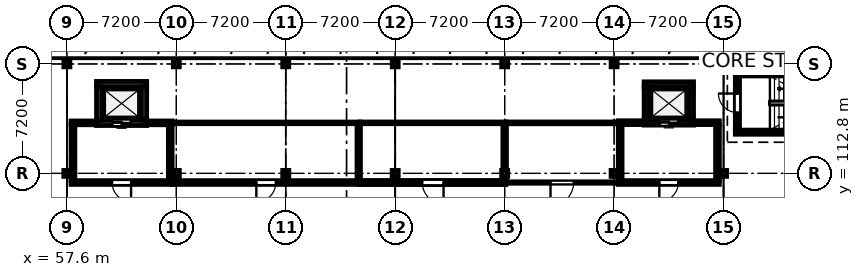
"""IFC4 building model, lengths in metres.
Left out: names, types, materials, properties, quantities, classifications, styles, units other than length and angle.
Written with IfcOpenShell. Run it as: python <this file> out.ifc"""

import sys

from ifc_helpers import new_model, si_unit, direction, frame, frame_2d, origin, origin_2d, place, context, subcontext, project, spatial, rectangle, i_section, extrude, element, fill, save


model = new_model("IFC4")
c1 = context("Model", 3, precision=1e-05, world=origin(), true_north=direction((0.0, 1.0)))
c2 = subcontext(c1, "Body", "Model", "MODEL_VIEW")
j1 = project(units=[si_unit("LENGTHUNIT", "METRE"), si_unit("PLANEANGLEUNIT", "RADIAN")], contexts=[c1])
p1 = place(None, origin())
s1 = spatial("IfcSite", under=j1, at=p1, CompositionType="ELEMENT")
p2 = place(p1, origin())
s2 = spatial("IfcBuilding", under=s1, at=p2, CompositionType="ELEMENT")
p3 = place(p2, frame((0.0, 0.0, 5.4)))
s3 = spatial("IfcBuildingStorey", under=s2, at=p3, CompositionType="ELEMENT", Elevation=5.4)
p4 = place(p3, frame((57.6, 112.8, 0.0), z_axis=(0.0, 0.0, 1.0), x_axis=(1.0, 0.0, 0.0)))
e1 = element("IfcColumn", 1, at=p4, inside=s3, PredefinedType="COLUMN", context=c2, shape_type="SweptSolid", body=[
    extrude(i_section(OverallWidth=0.399, OverallDepth=0.394, WebThickness=0.023, FlangeThickness=0.037, FilletRadius=0.015, at=origin_2d()), origin(), (0.0, 0.0, 1.0), 3.9),
])
p5 = place(p3, frame((57.6, 120.0, 0.0), z_axis=(0.0, 0.0, 1.0), x_axis=(1.0, 0.0, 0.0)))
e2 = element("IfcColumn", 2, at=p5, inside=s3, PredefinedType="COLUMN", context=c2, shape_type="SweptSolid", body=[
    extrude(i_section(OverallWidth=0.396, OverallDepth=0.381, WebThickness=0.019, FlangeThickness=0.03, FilletRadius=0.015, at=origin_2d()), origin(), (0.0, 0.0, 1.0), 3.9),
])
p6 = place(p3, frame((64.8, 112.8, 0.0), z_axis=(0.0, 0.0, 1.0), x_axis=(1.0, 0.0, 0.0)))
e3 = element("IfcColumn", 3, at=p6, inside=s3, PredefinedType="COLUMN", context=c2, shape_type="SweptSolid", body=[
    extrude(i_section(OverallWidth=0.399, OverallDepth=0.394, WebThickness=0.023, FlangeThickness=0.037, FilletRadius=0.015, at=origin_2d()), origin(), (0.0, 0.0, 1.0), 3.9),
])
p7 = place(p3, frame((64.8, 120.0, 0.0), z_axis=(0.0, 0.0, 1.0), x_axis=(1.0, 0.0, 0.0)))
e4 = element("IfcColumn", 4, at=p7, inside=s3, PredefinedType="COLUMN", context=c2, shape_type="SweptSolid", body=[
    extrude(i_section(OverallWidth=0.396, OverallDepth=0.381, WebThickness=0.019, FlangeThickness=0.03, FilletRadius=0.015, at=origin_2d()), origin(), (0.0, 0.0, 1.0), 3.9),
])
p8 = place(p3, frame((72.0, 112.8, 0.0), z_axis=(0.0, 0.0, 1.0), x_axis=(1.0, 0.0, 0.0)))
e5 = element("IfcColumn", 5, at=p8, inside=s3, PredefinedType="COLUMN", context=c2, shape_type="SweptSolid", body=[
    extrude(i_section(OverallWidth=0.399, OverallDepth=0.394, WebThickness=0.023, FlangeThickness=0.037, FilletRadius=0.015, at=origin_2d()), origin(), (0.0, 0.0, 1.0), 3.9),
])
p9 = place(p3, frame((72.0, 120.0, 0.0), z_axis=(0.0, 0.0, 1.0), x_axis=(1.0, 0.0, 0.0)))
e6 = element("IfcColumn", 6, at=p9, inside=s3, PredefinedType="COLUMN", context=c2, shape_type="SweptSolid", body=[
    extrude(i_section(OverallWidth=0.396, OverallDepth=0.381, WebThickness=0.019, FlangeThickness=0.03, FilletRadius=0.015, at=origin_2d()), origin(), (0.0, 0.0, 1.0), 3.9),
])
p10 = place(p3, frame((79.2, 112.8, 0.0), z_axis=(0.0, 0.0, 1.0), x_axis=(1.0, 0.0, 0.0)))
e7 = element("IfcColumn", 7, at=p10, inside=s3, PredefinedType="COLUMN", context=c2, shape_type="SweptSolid", body=[
    extrude(i_section(OverallWidth=0.399, OverallDepth=0.394, WebThickness=0.023, FlangeThickness=0.037, FilletRadius=0.015, at=origin_2d()), origin(), (0.0, 0.0, 1.0), 3.9),
])
p11 = place(p3, frame((79.2, 120.0, 0.0), z_axis=(0.0, 0.0, 1.0), x_axis=(1.0, 0.0, 0.0)))
e8 = element("IfcColumn", 8, at=p11, inside=s3, PredefinedType="COLUMN", context=c2, shape_type="SweptSolid", body=[
    extrude(i_section(OverallWidth=0.396, OverallDepth=0.381, WebThickness=0.019, FlangeThickness=0.03, FilletRadius=0.015, at=origin_2d()), origin(), (0.0, 0.0, 1.0), 3.9),
])
p12 = place(p3, frame((86.4, 112.8, 0.0), z_axis=(0.0, 0.0, 1.0), x_axis=(1.0, 0.0, 0.0)))
e9 = element("IfcColumn", 9, at=p12, inside=s3, PredefinedType="COLUMN", context=c2, shape_type="SweptSolid", body=[
    extrude(i_section(OverallWidth=0.399, OverallDepth=0.394, WebThickness=0.023, FlangeThickness=0.037, FilletRadius=0.015, at=origin_2d()), origin(), (0.0, 0.0, 1.0), 3.9),
])
p13 = place(p3, frame((86.4, 120.0, 0.0), z_axis=(0.0, 0.0, 1.0), x_axis=(1.0, 0.0, 0.0)))
e10 = element("IfcColumn", 10, at=p13, inside=s3, PredefinedType="COLUMN", context=c2, shape_type="SweptSolid", body=[
    extrude(i_section(OverallWidth=0.396, OverallDepth=0.381, WebThickness=0.019, FlangeThickness=0.03, FilletRadius=0.015, at=origin_2d()), origin(), (0.0, 0.0, 1.0), 3.9),
])
p14 = place(p3, frame((93.6, 112.8, 0.0), z_axis=(0.0, 0.0, 1.0), x_axis=(1.0, 0.0, 0.0)))
e11 = element("IfcColumn", 11, at=p14, inside=s3, PredefinedType="COLUMN", context=c2, shape_type="SweptSolid", body=[
    extrude(i_section(OverallWidth=0.399, OverallDepth=0.394, WebThickness=0.023, FlangeThickness=0.037, FilletRadius=0.015, at=origin_2d()), origin(), (0.0, 0.0, 1.0), 3.9),
])
p15 = place(p3, frame((93.6, 120.0, 0.0), z_axis=(0.0, 0.0, 1.0), x_axis=(1.0, 0.0, 0.0)))
e12 = element("IfcColumn", 12, at=p15, inside=s3, PredefinedType="COLUMN", context=c2, shape_type="SweptSolid", body=[
    extrude(i_section(OverallWidth=0.396, OverallDepth=0.381, WebThickness=0.019, FlangeThickness=0.03, FilletRadius=0.015, at=origin_2d()), origin(), (0.0, 0.0, 1.0), 3.9),
])
p16 = place(p3, frame((100.8, 112.8, 0.0), z_axis=(0.0, 0.0, 1.0), x_axis=(1.0, 0.0, 0.0)))
e13 = element("IfcColumn", 13, at=p16, inside=s3, PredefinedType="COLUMN", context=c2, shape_type="SweptSolid", body=[
    extrude(i_section(OverallWidth=0.399, OverallDepth=0.394, WebThickness=0.023, FlangeThickness=0.037, FilletRadius=0.015, at=origin_2d()), origin(), (0.0, 0.0, 1.0), 3.9),
])
p17 = place(p3, frame((100.8, 120.0, 0.0), z_axis=(0.0, 0.0, 1.0), x_axis=(1.0, 0.0, 0.0)))
e14 = element("IfcColumn", 14, at=p17, inside=s3, PredefinedType="COLUMN", context=c2, shape_type="SweptSolid", body=[
    extrude(i_section(OverallWidth=0.396, OverallDepth=0.381, WebThickness=0.019, FlangeThickness=0.03, FilletRadius=0.015, at=origin_2d()), origin(), (0.0, 0.0, 1.0), 3.9),
])
for number, where, z_axis, x_axis in (
    (15, (110.475, 115.512, 0.0), (0.0, 0.0, 1.0), (-1.0, 0.0, 0.0)),
    (16, (101.575, 119.348, 0.0), (0.0, 0.0, 1.0), (1.0, 0.0, 0.0)),
):
    element("IfcWall", number, at=place(p3, frame(where, z_axis=z_axis, x_axis=x_axis)), inside=s3, PredefinedType="SOLIDWALL", context=c2, shape_type="SweptSolid", body=[
        extrude(rectangle(XDim=8.9, YDim=0.275, at=frame_2d((4.45, 0.0))), origin(), (0.0, 0.0, 1.0), 3.67),
    ])
p18 = place(p3, frame((101.712, 115.65, 0.0), z_axis=(0.0, 0.0, 1.0), x_axis=(0.0, 1.0, 0.0)))
e17 = element("IfcWall", 17, at=p18, inside=s3, PredefinedType="SOLIDWALL", context=c2, shape_type="SweptSolid", body=[
    extrude(rectangle(XDim=3.56, YDim=0.275, at=frame_2d((1.78, 0.0))), origin(), (0.0, 0.0, 1.0), 3.67),
])
p19 = place(p18, frame((1.155, 0.0, 0.0)))
e18 = element("IfcOpeningElement", 18, at=p19, cuts=e17, PredefinedType="OPENING", context=c2, shape_type="SweptSolid", body=[
    extrude(rectangle(XDim=1.25, YDim=2.2, at=frame_2d((0.625, 1.1))), frame((0.0, 0.147, 0.0), z_axis=(0.0, -1.0, 0.0), x_axis=(1.0, 0.0, 0.0)), (0.0, 0.0, 1.0), 0.295),
])
p20 = place(p3, frame((62.85, 116.125, 0.0), z_axis=(0.0, 0.0, 1.0), x_axis=(-1.0, 0.0, 0.0)))
e19 = element("IfcWall", 19, at=p20, inside=s3, PredefinedType="SHEAR", context=c2, shape_type="SweptSolid", body=[
    extrude(rectangle(XDim=3.3, YDim=0.35, at=frame_2d((1.65, 0.0))), origin(), (0.0, 0.0, 1.0), 3.67),
])
p21 = place(p20, frame((1.05, 0.0, 0.0)))
e20 = element("IfcOpeningElement", 20, at=p21, cuts=e19, PredefinedType="OPENING", context=c2, shape_type="SweptSolid", body=[
    extrude(rectangle(XDim=1.2, YDim=2.2, at=frame_2d((0.6, 1.1))), frame((0.0, 0.185, 0.0), z_axis=(0.0, -1.0, 0.0), x_axis=(1.0, 0.0, 0.0)), (0.0, 0.0, 1.0), 0.37),
])
p22 = place(p3, frame((59.55, 118.675, 0.0), z_axis=(0.0, 0.0, 1.0), x_axis=(1.0, 0.0, 0.0)))
e21 = element("IfcWall", 21, at=p22, inside=s3, PredefinedType="SHEAR", context=c2, shape_type="SweptSolid", body=[
    extrude(rectangle(XDim=3.3, YDim=0.35, at=frame_2d((1.65, 0.0))), origin(), (0.0, 0.0, 1.0), 3.67),
])
for number, where, z_axis, x_axis in (
    (22, (59.725, 116.3, 0.0), (0.0, 0.0, 1.0), (0.0, 1.0, 0.0)),
    (23, (62.675, 118.5, 0.0), (0.0, 0.0, 1.0), (0.0, -1.0, 0.0)),
):
    element("IfcWall", number, at=place(p3, frame(where, z_axis=z_axis, x_axis=x_axis)), inside=s3, PredefinedType="SHEAR", context=c2, shape_type="SweptSolid", body=[
        extrude(rectangle(XDim=2.2, YDim=0.35, at=frame_2d((1.1, 0.0))), origin(), (0.0, 0.0, 1.0), 3.67),
    ])
p23 = place(p3, frame((98.825, 116.138, 0.0), z_axis=(0.0, 0.0, 1.0), x_axis=(-1.0, 0.0, 0.0)))
e24 = element("IfcWall", 24, at=p23, inside=s3, PredefinedType="SHEAR", context=c2, shape_type="SweptSolid", body=[
    extrude(rectangle(XDim=3.25, YDim=0.325, at=frame_2d((1.625, 0.0))), origin(), (0.0, 0.0, 1.0), 3.67),
])
p24 = place(p23, frame((1.025, 0.0, 0.0)))
e25 = element("IfcOpeningElement", 25, at=p24, cuts=e24, PredefinedType="OPENING", context=c2, shape_type="SweptSolid", body=[
    extrude(rectangle(XDim=1.2, YDim=2.2, at=frame_2d((0.6, 1.1))), frame((0.0, 0.172, 0.0), z_axis=(0.0, -1.0, 0.0), x_axis=(1.0, 0.0, 0.0)), (0.0, 0.0, 1.0), 0.345),
])
p25 = place(p3, frame((95.575, 118.662, 0.0), z_axis=(0.0, 0.0, 1.0), x_axis=(1.0, 0.0, 0.0)))
e26 = element("IfcWall", 26, at=p25, inside=s3, PredefinedType="SHEAR", context=c2, shape_type="SweptSolid", body=[
    extrude(rectangle(XDim=3.25, YDim=0.325, at=frame_2d((1.625, 0.0))), origin(), (0.0, 0.0, 1.0), 3.67),
])
for number, where, z_axis, x_axis in (
    (27, (95.738, 116.3, 0.0), (0.0, 0.0, 1.0), (0.0, 1.0, 0.0)),
    (28, (98.662, 118.5, 0.0), (0.0, 0.0, 1.0), (0.0, -1.0, 0.0)),
):
    element("IfcWall", number, at=place(p3, frame(where, z_axis=z_axis, x_axis=x_axis)), inside=s3, PredefinedType="SHEAR", context=c2, shape_type="SweptSolid", body=[
        extrude(rectangle(XDim=2.2, YDim=0.325, at=frame_2d((1.1, 0.0))), origin(), (0.0, 0.0, 1.0), 3.67),
    ])
p26 = place(p3, frame((64.525, 112.2, 0.0), z_axis=(0.0, 0.0, 1.0), x_axis=(-1.0, 0.0, 0.0)))
e29 = element("IfcWall", 29, at=p26, inside=s3, PredefinedType="PARTITIONING", context=c2, shape_type="SweptSolid", body=[
    extrude(rectangle(XDim=6.65, YDim=0.25, at=frame_2d((3.325, 0.0))), origin(), (0.0, 0.0, 1.0), 2.967),
])
p27 = place(p26, frame((2.7, 0.0, 0.0)))
e30 = element("IfcOpeningElement", 30, at=p27, cuts=e29, PredefinedType="OPENING", context=c2, shape_type="SweptSolid", body=[
    extrude(rectangle(XDim=1.25, YDim=2.2, at=frame_2d((0.625, 1.1))), frame((0.0, 0.135, 0.0), z_axis=(0.0, -1.0, 0.0), x_axis=(1.0, 0.0, 0.0)), (0.0, 0.0, 1.0), 0.27),
])
p28 = place(p3, frame((57.875, 116.125, 0.0), z_axis=(0.0, 0.0, 1.0), x_axis=(1.0, 0.0, 0.0)))
e31 = element("IfcWall", 31, at=p28, inside=s3, PredefinedType="PARTITIONING", context=c2, shape_type="SweptSolid", body=[
    extrude(rectangle(XDim=1.673, YDim=0.25, at=frame_2d((0.836, 0.0))), origin(), (0.0, 0.0, 1.0), 2.967),
])
p29 = place(p3, frame((62.852, 116.125, 0.0), z_axis=(0.0, 0.0, 1.0), x_axis=(1.0, 0.0, 0.0)))
e32 = element("IfcWall", 32, at=p29, inside=s3, PredefinedType="PARTITIONING", context=c2, shape_type="SweptSolid", body=[
    extrude(rectangle(XDim=1.673, YDim=0.25, at=frame_2d((0.836, 0.0))), origin(), (0.0, 0.0, 1.0), 2.967),
])
for number, where, z_axis, x_axis in (
    (33, (58.0, 112.327, 0.0), (0.0, 0.0, 1.0), (0.0, 1.0, 0.0)),
    (34, (64.4, 115.998, 0.0), (0.0, 0.0, 1.0), (0.0, -1.0, 0.0)),
):
    element("IfcWall", number, at=place(p3, frame(where, z_axis=z_axis, x_axis=x_axis)), inside=s3, PredefinedType="PARTITIONING", context=c2, shape_type="SweptSolid", body=[
        extrude(rectangle(XDim=3.671, YDim=0.25, at=frame_2d((1.835, 0.0))), origin(), (0.0, 0.0, 1.0), 2.967),
    ])
p30 = place(p3, frame((100.525, 112.2, 0.0), z_axis=(0.0, 0.0, 1.0), x_axis=(-1.0, 0.0, 0.0)))
e35 = element("IfcWall", 35, at=p30, inside=s3, PredefinedType="PARTITIONING", context=c2, shape_type="SweptSolid", body=[
    extrude(rectangle(XDim=6.65, YDim=0.25, at=frame_2d((3.325, 0.0))), origin(), (0.0, 0.0, 1.0), 2.967),
])
p31 = place(p30, frame((2.7, 0.0, 0.0)))
e36 = element("IfcOpeningElement", 36, at=p31, cuts=e35, PredefinedType="OPENING", context=c2, shape_type="SweptSolid", body=[
    extrude(rectangle(XDim=1.25, YDim=2.2, at=frame_2d((0.625, 1.1))), frame((0.0, 0.135, 0.0), z_axis=(0.0, -1.0, 0.0), x_axis=(1.0, 0.0, 0.0)), (0.0, 0.0, 1.0), 0.27),
])
for number, where, z_axis, x_axis in (
    (37, (93.875, 116.138, 0.0), (0.0, 0.0, 1.0), (1.0, 0.0, 0.0)),
    (38, (98.827, 116.138, 0.0), (0.0, 0.0, 1.0), (1.0, 0.0, 0.0)),
):
    element("IfcWall", number, at=place(p3, frame(where, z_axis=z_axis, x_axis=x_axis)), inside=s3, PredefinedType="PARTITIONING", context=c2, shape_type="SweptSolid", body=[
        extrude(rectangle(XDim=1.698, YDim=0.25, at=frame_2d((0.849, 0.0))), origin(), (0.0, 0.0, 1.0), 2.967),
    ])
for number, where, z_axis, x_axis in (
    (39, (94.0, 112.327, 0.0), (0.0, 0.0, 1.0), (0.0, 1.0, 0.0)),
    (40, (100.4, 116.011, 0.0), (0.0, 0.0, 1.0), (0.0, -1.0, 0.0)),
):
    element("IfcWall", number, at=place(p3, frame(where, z_axis=z_axis, x_axis=x_axis)), inside=s3, PredefinedType="PARTITIONING", context=c2, shape_type="SweptSolid", body=[
        extrude(rectangle(XDim=3.684, YDim=0.25, at=frame_2d((1.842, 0.0))), origin(), (0.0, 0.0, 1.0), 2.967),
    ])
p32 = place(p3, frame((76.88, 112.2, 0.0), z_axis=(0.0, 0.0, 1.0), x_axis=(-1.0, 0.0, 0.0)))
e41 = element("IfcWall", 41, at=p32, inside=s3, PredefinedType="PARTITIONING", context=c2, shape_type="SweptSolid", body=[
    extrude(rectangle(XDim=12.353, YDim=0.25, at=frame_2d((6.176, 0.0))), origin(), (0.0, 0.0, 1.0), 2.967),
])
p33 = place(p32, frame((5.536, 0.0, 0.0)))
e42 = element("IfcOpeningElement", 42, at=p33, cuts=e41, PredefinedType="OPENING", context=c2, shape_type="SweptSolid", body=[
    extrude(rectangle(XDim=1.28, YDim=2.28, at=frame_2d((0.64, 1.14))), frame((0.0, 0.135, 0.0), z_axis=(0.0, -1.0, 0.0), x_axis=(1.0, 0.0, 0.0)), (0.0, 0.0, 1.0), 0.27),
])
p34 = place(p3, frame((86.48, 112.2, 0.0), z_axis=(0.0, 0.0, 1.0), x_axis=(-1.0, 0.0, 0.0)))
e43 = element("IfcWall", 43, at=p34, inside=s3, PredefinedType="PARTITIONING", context=c2, shape_type="SweptSolid", body=[
    extrude(rectangle(XDim=9.598, YDim=0.27, at=frame_2d((4.799, 0.0))), origin(), (0.0, 0.0, 1.0), 2.967),
])
p35 = place(p34, frame((4.099, 0.0, 0.0)))
e44 = element("IfcOpeningElement", 44, at=p35, cuts=e43, PredefinedType="OPENING", context=c2, shape_type="SweptSolid", body=[
    extrude(rectangle(XDim=1.4, YDim=2.28, at=frame_2d((0.7, 1.14))), frame((0.0, 0.145, 0.0), z_axis=(0.0, -1.0, 0.0), x_axis=(1.0, 0.0, 0.0)), (0.0, 0.0, 1.0), 0.29),
])
p36 = place(p3, frame((93.873, 112.2, 0.0), z_axis=(0.0, 0.0, 1.0), x_axis=(-1.0, 0.0, 0.0)))
e45 = element("IfcWall", 45, at=p36, inside=s3, PredefinedType="PARTITIONING", context=c2, shape_type="SweptSolid", body=[
    extrude(rectangle(XDim=7.391, YDim=0.095, at=frame_2d((3.696, 0.0))), origin(), (0.0, 0.0, 1.0), 2.967),
])
p37 = place(p36, frame((2.936, 0.0, 0.0)))
e46 = element("IfcOpeningElement", 46, at=p37, cuts=e45, PredefinedType="OPENING", context=c2, shape_type="SweptSolid", body=[
    extrude(rectangle(XDim=1.52, YDim=2.28, at=frame_2d((0.76, 1.14))), frame((0.0, 0.057, 0.0), z_axis=(0.0, -1.0, 0.0), x_axis=(1.0, 0.0, 0.0)), (0.0, 0.0, 1.0), 0.115),
])
p38 = place(p3, frame((64.527, 116.125, 0.0), z_axis=(0.0, 0.0, 1.0), x_axis=(1.0, 0.0, 0.0)))
e47 = element("IfcWall", 47, at=p38, inside=s3, PredefinedType="PARTITIONING", context=c2, shape_type="SweptSolid", body=[
    extrude(rectangle(XDim=12.353, YDim=0.11, at=frame_2d((6.176, 0.0))), origin(), (0.0, 0.0, 1.0), 2.967),
])
p39 = place(p3, frame((76.882, 116.125, 0.0), z_axis=(0.0, 0.0, 1.0), x_axis=(1.0, 0.0, 0.0)))
e48 = element("IfcWall", 48, at=p39, inside=s3, PredefinedType="PARTITIONING", context=c2, shape_type="SweptSolid", body=[
    extrude(rectangle(XDim=9.598, YDim=0.115, at=frame_2d((4.799, 0.0))), origin(), (0.0, 0.0, 1.0), 2.967),
])
p40 = place(p3, frame((86.482, 116.125, 0.0), z_axis=(0.0, 0.0, 1.0), x_axis=(1.0, 0.0, 0.0)))
e49 = element("IfcWall", 49, at=p40, inside=s3, PredefinedType="PARTITIONING", context=c2, shape_type="SweptSolid", body=[
    extrude(rectangle(XDim=7.391, YDim=0.12, at=frame_2d((3.696, 0.0))), origin(), (0.0, 0.0, 1.0), 2.967),
])
p41 = place(p3, frame((76.8, 116.066, 0.0), z_axis=(0.0, 0.0, 1.0), x_axis=(0.0, -1.0, 0.0)))
e50 = element("IfcWall", 50, at=p41, inside=s3, PredefinedType="PARTITIONING", context=c2, shape_type="SweptSolid", body=[
    extrude(rectangle(XDim=3.729, YDim=0.225, at=frame_2d((1.865, 0.0))), origin(), (0.0, 0.0, 1.0), 2.967),
])
p42 = place(p3, frame((86.4, 116.063, 0.0), z_axis=(0.0, 0.0, 1.0), x_axis=(0.0, -1.0, 0.0)))
e51 = element("IfcWall", 51, at=p42, inside=s3, PredefinedType="PARTITIONING", context=c2, shape_type="SweptSolid", body=[
    extrude(rectangle(XDim=3.726, YDim=0.235, at=frame_2d((1.863, 0.0))), origin(), (0.0, 0.0, 1.0), 2.967),
])
p43 = place(p19, origin())
e52 = element("IfcDoor", 52, at=p43, inside=s3, OperationType="SINGLE_SWING_RIGHT", PredefinedType="DOOR", context=c2, shape_type="SweptSolid", body=[
    extrude(rectangle(XDim=1.25, YDim=2.2, at=frame_2d((0.625, 1.1))), frame((0.0, 0.025, 0.0), z_axis=(0.0, -1.0, 0.0), x_axis=(1.0, 0.0, 0.0)), (0.0, 0.0, 1.0), 0.05),
])
fill(e18, e52)
p44 = place(p21, origin())
e53 = element("IfcDoor", 53, at=p44, inside=s3, OperationType="DOUBLE_DOOR_SLIDING", PredefinedType="DOOR", context=c2, shape_type="SweptSolid", body=[
    extrude(rectangle(XDim=1.2, YDim=2.2, at=frame_2d((0.6, 1.1))), frame((0.0, 0.025, 0.0), z_axis=(0.0, -1.0, 0.0), x_axis=(1.0, 0.0, 0.0)), (0.0, 0.0, 1.0), 0.05),
])
fill(e20, e53)
p45 = place(p24, origin())
e54 = element("IfcDoor", 54, at=p45, inside=s3, OperationType="DOUBLE_DOOR_SLIDING", PredefinedType="DOOR", context=c2, shape_type="SweptSolid", body=[
    extrude(rectangle(XDim=1.2, YDim=2.2, at=frame_2d((0.6, 1.1))), frame((0.0, 0.025, 0.0), z_axis=(0.0, -1.0, 0.0), x_axis=(1.0, 0.0, 0.0)), (0.0, 0.0, 1.0), 0.05),
])
fill(e25, e54)
p46 = place(p27, origin())
e55 = element("IfcDoor", 55, at=p46, inside=s3, OperationType="SINGLE_SWING_LEFT", PredefinedType="DOOR", context=c2, shape_type="SweptSolid", body=[
    extrude(rectangle(XDim=1.25, YDim=2.2, at=frame_2d((0.625, 1.1))), frame((0.0, 0.025, 0.0), z_axis=(0.0, -1.0, 0.0), x_axis=(1.0, 0.0, 0.0)), (0.0, 0.0, 1.0), 0.05),
])
fill(e30, e55)
p47 = place(p31, origin())
e56 = element("IfcDoor", 56, at=p47, inside=s3, OperationType="SINGLE_SWING_RIGHT", PredefinedType="DOOR", context=c2, shape_type="SweptSolid", body=[
    extrude(rectangle(XDim=1.25, YDim=2.2, at=frame_2d((0.625, 1.1))), frame((0.0, 0.025, 0.0), z_axis=(0.0, -1.0, 0.0), x_axis=(1.0, 0.0, 0.0)), (0.0, 0.0, 1.0), 0.05),
])
fill(e36, e56)
p48 = place(p33, origin())
e57 = element("IfcDoor", 57, at=p48, inside=s3, OperationType="SINGLE_SWING_RIGHT", PredefinedType="DOOR", context=c2, shape_type="SweptSolid", body=[
    extrude(rectangle(XDim=1.28, YDim=2.28, at=frame_2d((0.64, 1.14))), frame((0.0, 0.025, 0.0), z_axis=(0.0, -1.0, 0.0), x_axis=(1.0, 0.0, 0.0)), (0.0, 0.0, 1.0), 0.05),
])
fill(e42, e57)
p49 = place(p35, origin())
e58 = element("IfcDoor", 58, at=p49, inside=s3, OperationType="SINGLE_SWING_LEFT", PredefinedType="DOOR", context=c2, shape_type="SweptSolid", body=[
    extrude(rectangle(XDim=1.4, YDim=2.28, at=frame_2d((0.7, 1.14))), frame((0.0, 0.025, 0.0), z_axis=(0.0, -1.0, 0.0), x_axis=(1.0, 0.0, 0.0)), (0.0, 0.0, 1.0), 0.05),
])
fill(e44, e58)
p50 = place(p37, origin())
e59 = element("IfcDoor", 59, at=p50, inside=s3, OperationType="SINGLE_SWING_RIGHT", PredefinedType="DOOR", context=c2, shape_type="SweptSolid", body=[
    extrude(rectangle(XDim=1.52, YDim=2.28, at=frame_2d((0.76, 1.14))), frame((0.0, 0.025, 0.0), z_axis=(0.0, -1.0, 0.0), x_axis=(1.0, 0.0, 0.0)), (0.0, 0.0, 1.0), 0.05),
])
fill(e46, e59)
save(model, sys.argv[1])
